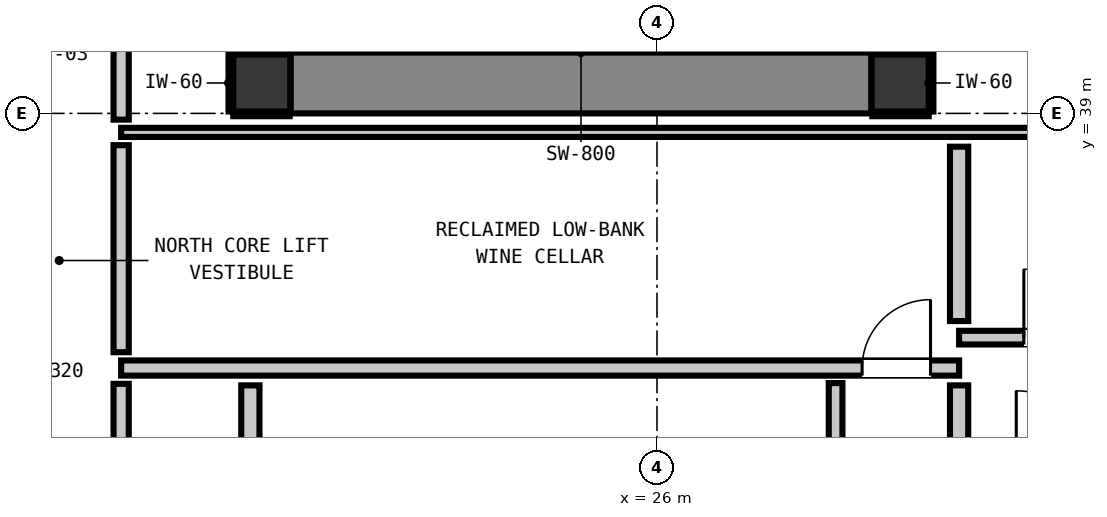
"""IFC4 building model, lengths in metres.
Left out: names, types, materials, properties, quantities, classifications, styles, units other than length and angle.
Written with IfcOpenShell. Run it as: python <this file> out.ifc"""

import sys

from ifc_helpers import new_model, si_unit, direction, frame, frame_2d, origin, origin_2d, place, context, subcontext, project, spatial, rectangle, extrude, element, fill, save


model = new_model("IFC4")
c1 = context("Model", 3, precision=1e-05, world=origin(), true_north=direction((0.0, 1.0)))
c2 = subcontext(c1, "Body", "Model", "MODEL_VIEW")
j1 = project(units=[si_unit("LENGTHUNIT", "METRE"), si_unit("PLANEANGLEUNIT", "RADIAN")], contexts=[c1])
p1 = place(None, origin())
s1 = spatial("IfcSite", under=j1, at=p1, CompositionType="ELEMENT")
p2 = place(p1, origin())
s2 = spatial("IfcBuilding", under=s1, at=p2, CompositionType="ELEMENT")
p3 = place(p2, frame((0.0, 0.0, 265.56)))
s3 = spatial("IfcBuildingStorey", under=s2, at=p3, CompositionType="ELEMENT", Elevation=265.56)
for number, where, z_axis, x_axis in (
    (1, (20.8, 39.4, 0.0), (0.0, 0.0, 1.0), (1.0, 0.0, 0.0)),
    (2, (29.2, 39.4, 0.0), (0.0, 0.0, 1.0), (1.0, 0.0, 0.0)),
):
    element("IfcColumn", number, at=place(p3, frame(where, z_axis=z_axis, x_axis=x_axis)), inside=s3, PredefinedType="COLUMN", context=c2, shape_type="SweptSolid", body=[
        extrude(rectangle(XDim=0.75, YDim=0.75, at=origin_2d()), origin(), (0.0, 0.0, 1.0), 3.32),
    ])
p4 = place(p3, frame((21.18, 39.4, 0.0), z_axis=(0.0, 0.0, 1.0), x_axis=(1.0, 0.0, 0.0)))
e3 = element("IfcWall", 3, at=p4, inside=s3, PredefinedType="SHEAR", context=c2, shape_type="SweptSolid", body=[
    extrude(rectangle(XDim=7.64, YDim=0.8, at=frame_2d((3.82, 0.0))), origin(), (0.0, 0.0, 1.0), 3.32),
])
p5 = place(p3, frame((18.95, 35.65, 0.0), z_axis=(0.0, 0.0, 1.0), x_axis=(1.0, 0.0, 0.0)))
e4 = element("IfcWall", 4, at=p5, inside=s3, PredefinedType="PARTITIONING", context=c2, shape_type="SweptSolid", body=[
    extrude(rectangle(XDim=11.025, YDim=0.2, at=frame_2d((5.513, 0.0))), origin(), (0.0, 0.0, 1.0), 3.1),
])
p6 = place(p5, frame((9.749, 0.0, 0.0)))
e5 = element("IfcOpeningElement", 5, at=p6, cuts=e4, PredefinedType="OPENING", context=c2, shape_type="SweptSolid", body=[
    extrude(rectangle(XDim=0.9, YDim=2.1, at=frame_2d((0.45, 1.05))), frame((0.0, 0.11, 0.0), z_axis=(0.0, -1.0, 0.0), x_axis=(1.0, 0.0, 0.0)), (0.0, 0.0, 1.0), 0.22),
])
p7 = place(p3, frame((29.975, 36.05, 0.0), z_axis=(0.0, 0.0, 1.0), x_axis=(1.0, 0.0, 0.0)))
e6 = element("IfcWall", 6, at=p7, inside=s3, PredefinedType="PARTITIONING", context=c2, shape_type="SweptSolid", body=[
    extrude(rectangle(XDim=2.505, YDim=0.18, at=frame_2d((1.252, 0.0))), origin(), (0.0, 0.0, 1.0), 3.1),
])
p8 = place(p7, frame((0.852, 0.0, 0.0)))
e7 = element("IfcOpeningElement", 7, at=p8, cuts=e6, PredefinedType="OPENING", context=c2, shape_type="SweptSolid", body=[
    extrude(rectangle(XDim=0.9, YDim=2.1, at=frame_2d((0.45, 1.05))), frame((0.0, 0.1, 0.0), z_axis=(0.0, -1.0, 0.0), x_axis=(1.0, 0.0, 0.0)), (0.0, 0.0, 1.0), 0.2),
])
p9 = place(p3, frame((18.95, 38.75, 0.0), z_axis=(0.0, 0.0, 1.0), x_axis=(1.0, 0.0, 0.0)))
e8 = element("IfcWall", 8, at=p9, inside=s3, PredefinedType="PARTITIONING", context=c2, shape_type="SweptSolid", body=[
    extrude(rectangle(XDim=13.56, YDim=0.12, at=frame_2d((6.78, 0.0))), origin(), (0.0, 0.0, 1.0), 3.1),
])
p10 = place(p3, frame((20.65, 33.148, 0.0), z_axis=(0.0, 0.0, 1.0), x_axis=(0.0, 1.0, 0.0)))
e9 = element("IfcWall", 9, at=p10, inside=s3, PredefinedType="PARTITIONING", context=c2, shape_type="SweptSolid", body=[
    extrude(rectangle(XDim=2.274, YDim=0.24, at=frame_2d((1.137, 0.0))), origin(), (0.0, 0.0, 1.0), 2.335),
])
p11 = place(p3, frame((29.975, 34.498, 0.0), z_axis=(0.0, 0.0, 1.0), x_axis=(0.0, 1.0, 0.0)))
e10 = element("IfcWall", 10, at=p11, inside=s3, PredefinedType="PARTITIONING", context=c2, shape_type="SweptSolid", body=[
    extrude(rectangle(XDim=0.924, YDim=0.24, at=frame_2d((0.462, 0.0))), origin(), (0.0, 0.0, 1.0), 3.1),
])
p12 = place(p3, frame((29.975, 36.268, 0.0), z_axis=(0.0, 0.0, 1.0), x_axis=(0.0, 1.0, 0.0)))
e11 = element("IfcWall", 11, at=p12, inside=s3, PredefinedType="PARTITIONING", context=c2, shape_type="SweptSolid", body=[
    extrude(rectangle(XDim=2.294, YDim=0.24, at=frame_2d((1.147, 0.0))), origin(), (0.0, 0.0, 1.0), 3.1),
])
p13 = place(p3, frame((18.95, 33.128, 0.0), z_axis=(0.0, 0.0, 1.0), x_axis=(0.0, 1.0, 0.0)))
e12 = element("IfcWall", 12, at=p13, inside=s3, PredefinedType="PARTITIONING", context=c2, shape_type="SweptSolid", body=[
    extrude(rectangle(XDim=2.314, YDim=0.2, at=frame_2d((1.157, 0.0))), origin(), (0.0, 0.0, 1.0), 3.1),
])
p14 = place(p3, frame((18.95, 35.858, 0.0), z_axis=(0.0, 0.0, 1.0), x_axis=(0.0, 1.0, 0.0)))
e13 = element("IfcWall", 13, at=p14, inside=s3, PredefinedType="PARTITIONING", context=c2, shape_type="SweptSolid", body=[
    extrude(rectangle(XDim=2.724, YDim=0.2, at=frame_2d((1.362, 0.0))), origin(), (0.0, 0.0, 1.0), 3.1),
])
p15 = place(p3, frame((18.95, 38.918, 0.0), z_axis=(0.0, 0.0, 1.0), x_axis=(0.0, 1.0, 0.0)))
e14 = element("IfcWall", 14, at=p15, inside=s3, PredefinedType="PARTITIONING", context=c2, shape_type="SweptSolid", body=[
    extrude(rectangle(XDim=1.134, YDim=0.2, at=frame_2d((0.567, 0.0))), origin(), (0.0, 0.0, 1.0), 3.1),
])
p16 = place(p3, frame((28.35, 31.838, 0.0), z_axis=(0.0, 0.0, 1.0), x_axis=(0.0, 1.0, 0.0)))
e15 = element("IfcWall", 15, at=p16, inside=s3, PredefinedType="PARTITIONING", context=c2, shape_type="SweptSolid", body=[
    extrude(rectangle(XDim=3.614, YDim=0.18, at=frame_2d((1.807, 0.0))), origin(), (0.0, 0.0, 1.0), 3.1),
])
for number, where, z_axis, x_axis in (
    (16, (20.425, 38.993, 0.0), (0.0, 0.0, 1.0), (1.0, 0.0, 0.0)),
    (17, (20.425, 39.807, 0.0), (0.0, 0.0, 1.0), (1.0, 0.0, 0.0)),
):
    element("IfcWall", number, at=place(p3, frame(where, z_axis=z_axis, x_axis=x_axis)), inside=s3, PredefinedType="PARTITIONING", context=c2, shape_type="SweptSolid", body=[
        extrude(rectangle(XDim=0.742, YDim=0.06, at=frame_2d((0.371, 0.0))), origin(), (0.0, 0.0, 1.0), 1.45),
    ])
p17 = place(p3, frame((20.393, 39.025, 0.0), z_axis=(0.0, 0.0, 1.0), x_axis=(0.0, 1.0, 0.0)))
e18 = element("IfcWall", 18, at=p17, inside=s3, PredefinedType="PARTITIONING", context=c2, shape_type="SweptSolid", body=[
    extrude(rectangle(XDim=0.75, YDim=0.06, at=frame_2d((0.375, 0.0))), origin(), (0.0, 0.0, 1.0), 1.45),
])
for number, where, z_axis, x_axis in (
    (19, (28.833, 38.993, 0.0), (0.0, 0.0, 1.0), (1.0, 0.0, 0.0)),
    (20, (28.833, 39.807, 0.0), (0.0, 0.0, 1.0), (1.0, 0.0, 0.0)),
):
    element("IfcWall", number, at=place(p3, frame(where, z_axis=z_axis, x_axis=x_axis)), inside=s3, PredefinedType="PARTITIONING", context=c2, shape_type="SweptSolid", body=[
        extrude(rectangle(XDim=0.742, YDim=0.06, at=frame_2d((0.371, 0.0))), origin(), (0.0, 0.0, 1.0), 1.45),
    ])
p18 = place(p3, frame((29.607, 39.025, 0.0), z_axis=(0.0, 0.0, 1.0), x_axis=(0.0, 1.0, 0.0)))
e21 = element("IfcWall", 21, at=p18, inside=s3, PredefinedType="PARTITIONING", context=c2, shape_type="SweptSolid", body=[
    extrude(rectangle(XDim=0.75, YDim=0.06, at=frame_2d((0.375, 0.0))), origin(), (0.0, 0.0, 1.0), 1.45),
])
p19 = place(p8, origin())
e22 = element("IfcDoor", 22, at=p19, inside=s3, OperationType="SINGLE_SWING_LEFT", PredefinedType="DOOR", context=c2, shape_type="SweptSolid", body=[
    extrude(rectangle(XDim=0.9, YDim=2.1, at=frame_2d((0.45, 1.05))), frame((0.0, 0.025, 0.0), z_axis=(0.0, -1.0, 0.0), x_axis=(1.0, 0.0, 0.0)), (0.0, 0.0, 1.0), 0.05),
])
fill(e7, e22)
p20 = place(p6, origin())
e23 = element("IfcDoor", 23, at=p20, inside=s3, OperationType="SINGLE_SWING_RIGHT", PredefinedType="DOOR", context=c2, shape_type="SweptSolid", body=[
    extrude(rectangle(XDim=0.9, YDim=2.1, at=frame_2d((0.45, 1.05))), frame((0.0, 0.025, 0.0), z_axis=(0.0, -1.0, 0.0), x_axis=(1.0, 0.0, 0.0)), (0.0, 0.0, 1.0), 0.05),
])
fill(e5, e23)
save(model, sys.argv[1])
